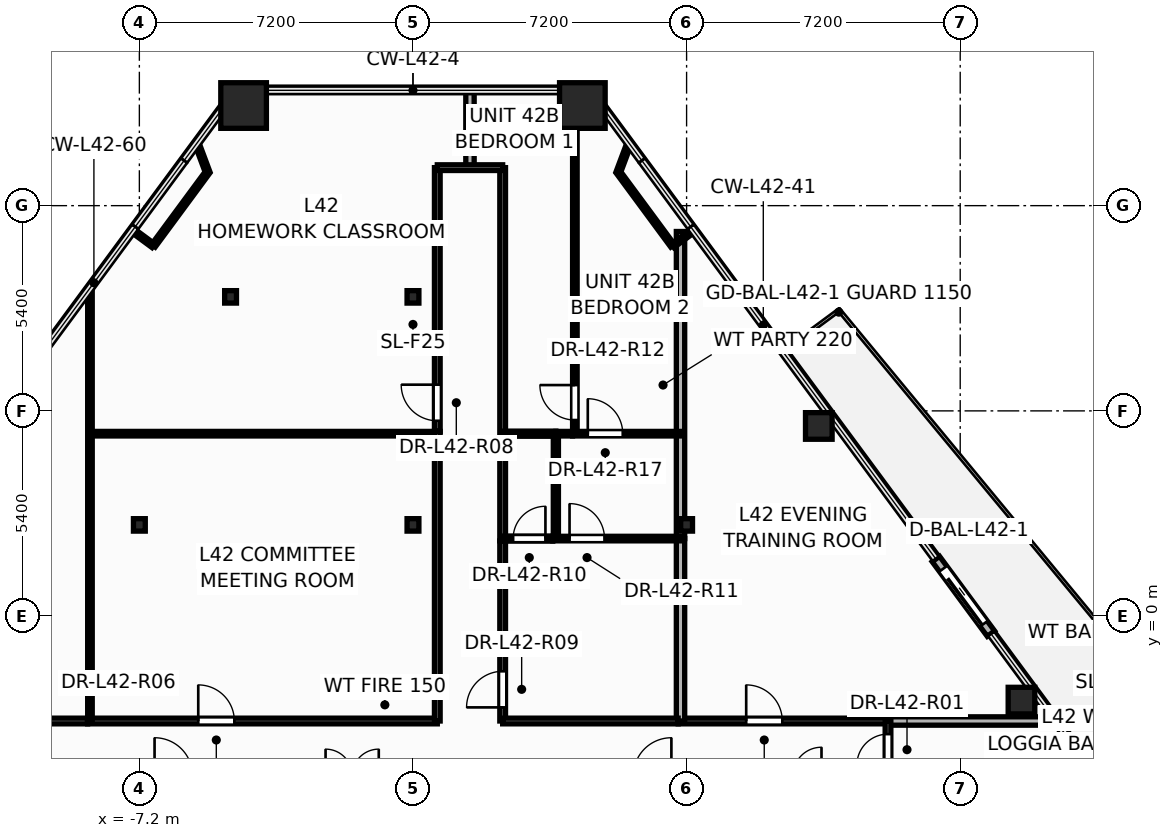
"""IFC4 building model, lengths in metres.
Left out: names, types, materials, properties, quantities, classifications, styles, units other than length and angle.
Written with IfcOpenShell. Run it as: python <this file> out.ifc"""

import sys

from ifc_helpers import new_model, si_unit, direction, frame, frame_2d, origin, origin_2d, place, context, subcontext, project, spatial, rectangle, hollow_rectangle, hollow_circle, i_section, extrude, element, fill, save


model = new_model("IFC4")
c1 = context("Model", 3, precision=1e-05, world=origin(), true_north=direction((0.0, 1.0)))
c2 = subcontext(c1, "Body", "Model", "MODEL_VIEW")
j1 = project(units=[si_unit("LENGTHUNIT", "METRE"), si_unit("PLANEANGLEUNIT", "RADIAN")], contexts=[c1])
p1 = place(None, origin())
s1 = spatial("IfcSite", under=j1, at=p1, CompositionType="ELEMENT")
p2 = place(p1, origin())
s2 = spatial("IfcBuilding", under=s1, at=p2, CompositionType="ELEMENT")
p3 = place(p2, frame((0.0, 0.0, 161.7)))
s3 = spatial("IfcBuildingStorey", under=s2, at=p3, CompositionType="ELEMENT", Elevation=161.7)
for number, where, z_axis, x_axis in (
    (1, (4.457, 13.435, 0.0), (0.0, 0.0, 1.0), (1.0, 0.0, 0.0)),
    (2, (-4.457, 13.435, 0.0), (0.0, 0.0, 1.0), (1.0, 0.0, 0.0)),
):
    element("IfcColumn", number, at=place(p3, frame(where, z_axis=z_axis, x_axis=x_axis)), inside=s3, PredefinedType="COLUMN", context=c2, shape_type="SweptSolid", body=[
        extrude(hollow_rectangle(XDim=1.2, YDim=1.2, WallThickness=0.055, at=origin_2d()), origin(), (0.0, 0.0, 1.0), 3.6),
    ])
for number, where, z_axis, x_axis in (
    (3, (16.012, -2.223, 0.0), (0.0, 0.0, 1.0), (1.0, 0.0, 0.0)),
    (4, (10.679, 5.003, 0.0), (0.0, 0.0, 1.0), (1.0, 0.0, 0.0)),
):
    element("IfcColumn", number, at=place(p3, frame(where, z_axis=z_axis, x_axis=x_axis)), inside=s3, PredefinedType="COLUMN", context=c2, shape_type="SweptSolid", body=[
        extrude(hollow_circle(Radius=0.35, WallThickness=0.03, at=origin_2d()), origin(), (0.0, 0.0, 1.0), 3.6),
    ])
for number, where, z_axis, x_axis in (
    (5, (-7.2, 2.4, 0.0), (0.0, 0.0, 1.0), (1.0, 0.0, 0.0)),
    (6, (0.0, 2.4, 0.0), (0.0, 0.0, 1.0), (1.0, 0.0, 0.0)),
    (7, (7.2, 2.4, 0.0), (0.0, 0.0, 1.0), (1.0, 0.0, 0.0)),
    (8, (-4.8, 8.4, 0.0), (0.0, 0.0, 1.0), (1.0, 0.0, 0.0)),
    (9, (0.0, 8.4, 0.0), (0.0, 0.0, 1.0), (1.0, 0.0, 0.0)),
    (10, (4.8, 8.4, 0.0), (0.0, 0.0, 1.0), (1.0, 0.0, 0.0)),
):
    element("IfcColumn", number, at=place(p3, frame(where, z_axis=z_axis, x_axis=x_axis)), inside=s3, PredefinedType="COLUMN", context=c2, shape_type="SweptSolid", body=[
        extrude(i_section(OverallWidth=0.311, OverallDepth=0.327, WebThickness=0.016, FlangeThickness=0.025, at=origin_2d()), origin(), (0.0, 0.0, 1.0), 3.6),
    ])
p4 = place(p3, frame((15.208, -0.461, -0.015), z_axis=(0.0, 0.0, 1.0), x_axis=(-0.593785976482, 0.804623026102, 0.0)))
e11 = element("IfcWall", 11, at=p4, inside=s3, PredefinedType="STANDARD", context=c2, shape_type="SweptSolid", body=[
    extrude(rectangle(XDim=2.44, YDim=0.24, at=frame_2d((1.22, 0.0))), origin(), (0.0, 0.0, 1.0), 2.807),
])
p5 = place(p4, frame((0.32, 0.0, 0.015)))
e12 = element("IfcOpeningElement", 12, at=p5, cuts=e11, PredefinedType="OPENING", context=c2, shape_type="SweptSolid", body=[
    extrude(rectangle(XDim=1.806, YDim=2.204, at=frame_2d((0.9, 1.102))), frame((0.0, 0.13, 0.0), z_axis=(0.0, -1.0, 0.0), x_axis=(1.0, 0.0, 0.0)), (0.0, 0.0, 1.0), 0.26),
])
p6 = place(p3, frame((-8.56, -2.76, 0.0), z_axis=(0.0, 0.0, 1.0), x_axis=(1.0, 0.0, 0.0)))
e13 = element("IfcWall", 13, at=p6, inside=s3, PredefinedType="PARTITIONING", context=c2, shape_type="SweptSolid", body=[
    extrude(rectangle(XDim=9.2, YDim=0.15, at=frame_2d((4.6, 0.0))), origin(), (0.0, 0.0, 1.0), 2.325),
])
p7 = place(p6, frame((2.91, 0.0, 0.0)))
e14 = element("IfcOpeningElement", 14, at=p7, cuts=e13, PredefinedType="OPENING", context=c2, shape_type="SweptSolid", body=[
    extrude(rectangle(XDim=0.956, YDim=2.104, at=frame_2d((0.475, 1.052))), frame((0.0, 0.085, 0.0), z_axis=(0.0, -1.0, 0.0), x_axis=(1.0, 0.0, 0.0)), (0.0, 0.0, 1.0), 0.17),
])
p8 = place(p3, frame((-8.5, 4.8, 0.0), z_axis=(0.0, 0.0, 1.0), x_axis=(1.0, 0.0, 0.0)))
e15 = element("IfcWall", 15, at=p8, inside=s3, PredefinedType="PARTITIONING", context=c2, shape_type="SweptSolid", body=[
    extrude(rectangle(XDim=9.14, YDim=0.12, at=frame_2d((4.57, 0.0))), origin(), (0.0, 0.0, 1.0), 2.325),
])
p9 = place(p3, frame((4.26, 4.8, 0.0), z_axis=(0.0, 0.0, 1.0), x_axis=(0.0, 1.0, 0.0)))
e16 = element("IfcWall", 16, at=p9, inside=s3, PredefinedType="PARTITIONING", context=c2, shape_type="SweptSolid", body=[
    extrude(rectangle(XDim=9.035, YDim=0.12, at=frame_2d((4.517, 0.0))), origin(), (0.0, 0.0, 1.0), 2.617),
])
p10 = place(p9, frame((0.359, 0.0, 0.0)))
e17 = element("IfcOpeningElement", 17, at=p10, cuts=e16, PredefinedType="OPENING", context=c2, shape_type="SweptSolid", body=[
    extrude(rectangle(XDim=0.926, YDim=2.104, at=frame_2d((0.46, 1.052))), frame((0.0, 0.07, 0.0), z_axis=(0.0, -1.0, 0.0), x_axis=(1.0, 0.0, 0.0)), (0.0, 0.0, 1.0), 0.14),
])
p11 = place(p3, frame((0.64, -2.76, 0.0), z_axis=(0.0, 0.0, 1.0), x_axis=(0.0, 1.0, 0.0)))
e18 = element("IfcWall", 18, at=p11, inside=s3, PredefinedType="PARTITIONING", context=c2, shape_type="SweptSolid", body=[
    extrude(rectangle(XDim=7.62, YDim=0.15, at=frame_2d((3.81, 0.0))), origin(), (0.0, 0.0, 1.0), 2.325),
])
p12 = place(p3, frame((-8.5, -2.76, 0.0), z_axis=(0.0, 0.0, 1.0), x_axis=(0.0, 1.0, 0.0)))
e19 = element("IfcWall", 19, at=p12, inside=s3, PredefinedType="PARTITIONING", context=c2, shape_type="SweptSolid", body=[
    extrude(rectangle(XDim=11.39, YDim=0.12, at=frame_2d((5.695, 0.0))), origin(), (0.0, 0.0, 1.0), 2.617),
])
p13 = place(p3, frame((0.64, 4.862, 0.0), z_axis=(0.0, 0.0, 1.0), x_axis=(0.0, 1.0, 0.0)))
e20 = element("IfcWall", 20, at=p13, inside=s3, PredefinedType="PARTITIONING", context=c2, shape_type="SweptSolid", body=[
    extrude(rectangle(XDim=6.938, YDim=0.15, at=frame_2d((3.469, 0.0))), origin(), (0.0, 0.0, 1.0), 2.617),
])
p14 = place(p13, frame((0.278, 0.0, 0.0)))
e21 = element("IfcOpeningElement", 21, at=p14, cuts=e20, PredefinedType="OPENING", context=c2, shape_type="SweptSolid", body=[
    extrude(rectangle(XDim=0.956, YDim=2.104, at=frame_2d((0.475, 1.052))), frame((0.0, 0.085, 0.0), z_axis=(0.0, -1.0, 0.0), x_axis=(1.0, 0.0, 0.0)), (0.0, 0.0, 1.0), 0.17),
])
p15 = place(p3, frame((2.36, 1.98, 0.0), z_axis=(0.0, 0.0, 1.0), x_axis=(0.0, 1.0, 0.0)))
e22 = element("IfcWall", 22, at=p15, inside=s3, PredefinedType="PARTITIONING", context=c2, shape_type="SweptSolid", body=[
    extrude(rectangle(XDim=9.82, YDim=0.15, at=frame_2d((4.91, 0.0))), origin(), (0.0, 0.0, 1.0), 2.325),
])
p16 = place(p3, frame((6.98, -2.76, 0.0), z_axis=(0.0, 0.0, 1.0), x_axis=(1.0, 0.0, 0.0)))
e23 = element("IfcWall", 23, at=p16, inside=s3, PredefinedType="PARTITIONING", context=c2, shape_type="SweptSolid", body=[
    extrude(rectangle(XDim=5.52, YDim=0.15, at=frame_2d((2.76, 0.0))), origin(), (0.0, 0.0, 1.0), 2.325),
])
p17 = place(p16, frame((1.788, 0.0, 0.0)))
e24 = element("IfcOpeningElement", 24, at=p17, cuts=e23, PredefinedType="OPENING", context=c2, shape_type="SweptSolid", body=[
    extrude(rectangle(XDim=0.956, YDim=2.104, at=frame_2d((0.475, 1.052))), frame((0.0, 0.085, 0.0), z_axis=(0.0, -1.0, 0.0), x_axis=(1.0, 0.0, 0.0)), (0.0, 0.0, 1.0), 0.17),
])
p18 = place(p3, frame((7.04, 2.04, 0.0), z_axis=(0.0, 0.0, 1.0), x_axis=(0.0, 1.0, 0.0)))
e25 = element("IfcWall", 25, at=p18, inside=s3, PredefinedType="PARTITIONING", context=c2, shape_type="SweptSolid", body=[
    extrude(rectangle(XDim=8.08, YDim=0.22, at=frame_2d((4.04, 0.0))), origin(), (0.0, 0.0, 1.0), 2.325),
])
p19 = place(p3, frame((2.36, -2.76, 0.0), z_axis=(0.0, 0.0, 1.0), x_axis=(0.0, 1.0, 0.0)))
e26 = element("IfcWall", 26, at=p19, inside=s3, PredefinedType="PARTITIONING", context=c2, shape_type="SweptSolid", body=[
    extrude(rectangle(XDim=4.738, YDim=0.15, at=frame_2d((2.369, 0.0))), origin(), (0.0, 0.0, 1.0), 3.35),
])
p20 = place(p19, frame((0.358, 0.0, 0.0)))
e27 = element("IfcOpeningElement", 27, at=p20, cuts=e26, PredefinedType="OPENING", context=c2, shape_type="SweptSolid", body=[
    extrude(rectangle(XDim=0.956, YDim=2.104, at=frame_2d((0.475, 1.052))), frame((0.0, 0.085, 0.0), z_axis=(0.0, -1.0, 0.0), x_axis=(1.0, 0.0, 0.0)), (0.0, 0.0, 1.0), 0.17),
])
p21 = place(p3, frame((7.04, -2.76, 0.0), z_axis=(0.0, 0.0, 1.0), x_axis=(0.0, 1.0, 0.0)))
e28 = element("IfcWall", 28, at=p21, inside=s3, PredefinedType="PARTITIONING", context=c2, shape_type="SweptSolid", body=[
    extrude(rectangle(XDim=4.8, YDim=0.22, at=frame_2d((2.4, 0.0))), origin(), (0.0, 0.0, 1.0), 2.325),
])
p22 = place(p3, frame((2.36, -2.76, 0.0), z_axis=(0.0, 0.0, 1.0), x_axis=(1.0, 0.0, 0.0)))
e29 = element("IfcWall", 29, at=p22, inside=s3, PredefinedType="PARTITIONING", context=c2, shape_type="SweptSolid", body=[
    extrude(rectangle(XDim=4.618, YDim=0.15, at=frame_2d((2.309, 0.0))), origin(), (0.0, 0.0, 1.0), 2.919),
])
p23 = place(p3, frame((12.5, -2.76, 0.0), z_axis=(0.0, 0.0, 1.0), x_axis=(1.0, 0.0, 0.0)))
e30 = element("IfcWall", 30, at=p23, inside=s3, PredefinedType="PARTITIONING", context=c2, shape_type="SweptSolid", body=[
    extrude(rectangle(XDim=4.405, YDim=0.22, at=frame_2d((2.203, 0.0))), origin(), (0.0, 0.0, 1.0), 2.792),
])
p24 = place(p3, frame((-12.5, -2.76, 0.0), z_axis=(0.0, 0.0, 1.0), x_axis=(1.0, 0.0, 0.0)))
e31 = element("IfcWall", 31, at=p24, inside=s3, PredefinedType="PARTITIONING", context=c2, shape_type="SweptSolid", body=[
    extrude(rectangle(XDim=3.938, YDim=0.15, at=frame_2d((1.969, 0.0))), origin(), (0.0, 0.0, 1.0), 3.35),
])
p25 = place(p24, frame((1.675, 0.0, 0.0)))
e32 = element("IfcOpeningElement", 32, at=p25, cuts=e31, PredefinedType="OPENING", context=c2, shape_type="SweptSolid", body=[
    extrude(rectangle(XDim=0.956, YDim=2.104, at=frame_2d((0.475, 1.052))), frame((0.0, 0.085, 0.0), z_axis=(0.0, -1.0, 0.0), x_axis=(1.0, 0.0, 0.0)), (0.0, 0.0, 1.0), 0.17),
])
p26 = place(p3, frame((3.68, 2.04, 0.0), z_axis=(0.0, 0.0, 1.0), x_axis=(1.0, 0.0, 0.0)))
e33 = element("IfcWall", 33, at=p26, inside=s3, PredefinedType="PARTITIONING", context=c2, shape_type="SweptSolid", body=[
    extrude(rectangle(XDim=3.36, YDim=0.12, at=frame_2d((1.68, 0.0))), origin(), (0.0, 0.0, 1.0), 2.325),
])
p27 = place(p26, frame((0.44, 0.0, 0.0)))
e34 = element("IfcOpeningElement", 34, at=p27, cuts=e33, PredefinedType="OPENING", context=c2, shape_type="SweptSolid", body=[
    extrude(rectangle(XDim=0.926, YDim=2.104, at=frame_2d((0.46, 1.052))), frame((0.0, 0.07, 0.0), z_axis=(0.0, -1.0, 0.0), x_axis=(1.0, 0.0, 0.0)), (0.0, 0.0, 1.0), 0.14),
])
p28 = place(p3, frame((4.2, 4.8, 0.0), z_axis=(0.0, 0.0, 1.0), x_axis=(1.0, 0.0, 0.0)))
e35 = element("IfcWall", 35, at=p28, inside=s3, PredefinedType="PARTITIONING", context=c2, shape_type="SweptSolid", body=[
    extrude(rectangle(XDim=2.84, YDim=0.12, at=frame_2d((1.42, 0.0))), origin(), (0.0, 0.0, 1.0), 2.617),
])
p29 = place(p28, frame((0.4, 0.0, 0.0)))
e36 = element("IfcOpeningElement", 36, at=p29, cuts=e35, PredefinedType="OPENING", context=c2, shape_type="SweptSolid", body=[
    extrude(rectangle(XDim=0.926, YDim=2.104, at=frame_2d((0.46, 1.052))), frame((0.0, 0.07, 0.0), z_axis=(0.0, -1.0, 0.0), x_axis=(1.0, 0.0, 0.0)), (0.0, 0.0, 1.0), 0.14),
])
p30 = place(p3, frame((3.76, 2.04, 0.0), z_axis=(0.0, 0.0, 1.0), x_axis=(0.0, 1.0, 0.0)))
e37 = element("IfcWall", 37, at=p30, inside=s3, PredefinedType="PARTITIONING", context=c2, shape_type="SweptSolid", body=[
    extrude(rectangle(XDim=2.76, YDim=0.135, at=frame_2d((1.38, 0.0))), origin(), (0.0, 0.0, 1.0), 2.325),
])
for number, where, z_axis, x_axis in (
    (38, (-5.404, 11.68, 0.0), (0.0, 0.0, 1.0), (-0.594, -0.805, 0.0)),
    (39, (6.831, 9.746, 0.0), (0.0, 0.0, 1.0), (-0.594, 0.805, 0.0)),
):
    element("IfcWall", number, at=place(p3, frame(where, z_axis=z_axis, x_axis=x_axis)), inside=s3, PredefinedType="PARTITIONING", context=c2, shape_type="SweptSolid", body=[
        extrude(rectangle(XDim=2.404, YDim=0.12, at=frame_2d((1.202, 0.0))), origin(), (0.0, 0.0, 1.0), 3.35),
    ])
p31 = place(p3, frame((1.5, 11.8, 0.0), z_axis=(0.0, 0.0, 1.0), x_axis=(0.0, 1.0, 0.0)))
e40 = element("IfcWall", 40, at=p31, inside=s3, PredefinedType="PARTITIONING", context=c2, shape_type="SweptSolid", body=[
    extrude(rectangle(XDim=2.035, YDim=0.22, at=frame_2d((1.017, 0.0))), origin(), (0.0, 0.0, 1.0), 2.792),
])
p32 = place(p3, frame((12.5, -4.24, 0.0), z_axis=(0.0, 0.0, 1.0), x_axis=(0.0, 1.0, 0.0)))
e41 = element("IfcWall", 41, at=p32, inside=s3, PredefinedType="PARTITIONING", context=c2, shape_type="SweptSolid", body=[
    extrude(rectangle(XDim=1.48, YDim=0.15, at=frame_2d((0.74, 0.0))), origin(), (0.0, 0.0, 1.0), 2.325),
])
p33 = place(p32, frame((0.315, 0.0, 0.0)))
e42 = element("IfcOpeningElement", 42, at=p33, cuts=e41, PredefinedType="OPENING", context=c2, shape_type="SweptSolid", body=[
    extrude(rectangle(XDim=0.826, YDim=2.104, at=frame_2d((0.41, 1.052))), frame((0.0, 0.085, 0.0), z_axis=(0.0, -1.0, 0.0), x_axis=(1.0, 0.0, 0.0)), (0.0, 0.0, 1.0), 0.17),
])
p34 = place(p3, frame((2.36, 2.04, 0.0), z_axis=(0.0, 0.0, 1.0), x_axis=(1.0, 0.0, 0.0)))
e43 = element("IfcWall", 43, at=p34, inside=s3, PredefinedType="PARTITIONING", context=c2, shape_type="SweptSolid", body=[
    extrude(rectangle(XDim=1.318, YDim=0.135, at=frame_2d((0.659, 0.0))), origin(), (0.0, 0.0, 1.0), 2.919),
])
p35 = place(p34, frame((0.276, 0.0, 0.0)))
e44 = element("IfcOpeningElement", 44, at=p35, cuts=e43, PredefinedType="OPENING", context=c2, shape_type="SweptSolid", body=[
    extrude(rectangle(XDim=0.856, YDim=2.104, at=frame_2d((0.425, 1.052))), frame((0.0, 0.078, 0.0), z_axis=(0.0, -1.0, 0.0), x_axis=(1.0, 0.0, 0.0)), (0.0, 0.0, 1.0), 0.155),
])
p36 = place(p3, frame((2.36, 4.8, 0.0), z_axis=(0.0, 0.0, 1.0), x_axis=(1.0, 0.0, 0.0)))
e45 = element("IfcWall", 45, at=p36, inside=s3, PredefinedType="PARTITIONING", context=c2, shape_type="SweptSolid", body=[
    extrude(rectangle(XDim=1.4, YDim=0.135, at=frame_2d((0.7, 0.0))), origin(), (0.0, 0.0, 1.0), 2.919),
])
p37 = place(p3, frame((0.64, 11.8, 0.0), z_axis=(0.0, 0.0, 1.0), x_axis=(1.0, 0.0, 0.0)))
e46 = element("IfcWall", 46, at=p37, inside=s3, PredefinedType="PARTITIONING", context=c2, shape_type="SweptSolid", body=[
    extrude(rectangle(XDim=1.72, YDim=0.15, at=frame_2d((0.86, 0.0))), origin(), (0.0, 0.0, 1.0), 3.35),
])
for number, where, z_axis, x_axis in (
    (47, (-5.684, 12.429, 0.0), (0.0, 0.0, 1.0), (0.351, -0.937, 0.0)),
    (48, (5.404, 11.68, 0.0), (0.0, 0.0, 1.0), (0.351, 0.937, 0.0)),
):
    element("IfcWall", number, at=place(p3, frame(where, z_axis=z_axis, x_axis=x_axis)), inside=s3, PredefinedType="PARTITIONING", context=c2, shape_type="SweptSolid", body=[
        extrude(rectangle(XDim=0.799, YDim=0.12, at=frame_2d((0.4, 0.0))), origin(), (0.0, 0.0, 1.0), 2.792),
    ])
for number, where, z_axis, x_axis in (
    (49, (-6.831, 9.746, 0.0), (0.0, 0.0, 1.0), (-0.805, 0.594, 0.0)),
    (50, (7.371, 10.144, 0.0), (0.0, 0.0, 1.0), (-0.805, -0.594, 0.0)),
):
    element("IfcWall", number, at=place(p3, frame(where, z_axis=z_axis, x_axis=x_axis)), inside=s3, PredefinedType="PARTITIONING", context=c2, shape_type="SweptSolid", body=[
        extrude(rectangle(XDim=0.67, YDim=0.12, at=frame_2d((0.335, 0.0))), origin(), (0.0, 0.0, 1.0), 2.792),
    ])
p38 = place(p3, frame((3.76, 4.8, 0.0), z_axis=(0.0, 0.0, 1.0), x_axis=(1.0, 0.0, 0.0)))
e51 = element("IfcWall", 51, at=p38, inside=s3, PredefinedType="PARTITIONING", context=c2, shape_type="SweptSolid", body=[
    extrude(rectangle(XDim=0.438, YDim=0.12, at=frame_2d((0.219, 0.0))), origin(), (0.0, 0.0, 1.0), 3.35),
])
p39 = place(p5, origin())
e52 = element("IfcDoor", 52, at=p39, inside=s3, OperationType="SLIDING_TO_LEFT", PredefinedType="DOOR", context=c2, shape_type="SweptSolid", body=[
    extrude(rectangle(XDim=1.8, YDim=2.2, at=frame_2d((0.9, 1.1))), frame((0.0, 0.025, 0.0), z_axis=(0.0, -1.0, 0.0), x_axis=(1.0, 0.0, 0.0)), (0.0, 0.0, 1.0), 0.05),
])
fill(e12, e52)
p40 = place(p33, origin())
e53 = element("IfcDoor", 53, at=p40, inside=s3, OperationType="SINGLE_SWING_LEFT", PredefinedType="DOOR", context=c2, shape_type="SweptSolid", body=[
    extrude(rectangle(XDim=0.82, YDim=2.1, at=frame_2d((0.41, 1.05))), frame((0.0, 0.025, 0.0), z_axis=(0.0, -1.0, 0.0), x_axis=(1.0, 0.0, 0.0)), (0.0, 0.0, 1.0), 0.05),
])
fill(e42, e53)
p41 = place(p7, origin())
e54 = element("IfcDoor", 54, at=p41, inside=s3, OperationType="SINGLE_SWING_LEFT", PredefinedType="DOOR", context=c2, shape_type="SweptSolid", body=[
    extrude(rectangle(XDim=0.95, YDim=2.1, at=frame_2d((0.475, 1.05))), frame((0.0, 0.025, 0.0), z_axis=(0.0, -1.0, 0.0), x_axis=(1.0, 0.0, 0.0)), (0.0, 0.0, 1.0), 0.05),
])
fill(e14, e54)
p42 = place(p14, origin())
e55 = element("IfcDoor", 55, at=p42, inside=s3, OperationType="SINGLE_SWING_RIGHT", PredefinedType="DOOR", context=c2, shape_type="SweptSolid", body=[
    extrude(rectangle(XDim=0.95, YDim=2.1, at=frame_2d((0.475, 1.05))), frame((0.0, 0.025, 0.0), z_axis=(0.0, -1.0, 0.0), x_axis=(1.0, 0.0, 0.0)), (0.0, 0.0, 1.0), 0.05),
])
fill(e21, e55)
p43 = place(p20, origin())
e56 = element("IfcDoor", 56, at=p43, inside=s3, OperationType="SINGLE_SWING_LEFT", PredefinedType="DOOR", context=c2, shape_type="SweptSolid", body=[
    extrude(rectangle(XDim=0.95, YDim=2.1, at=frame_2d((0.475, 1.05))), frame((0.0, 0.025, 0.0), z_axis=(0.0, -1.0, 0.0), x_axis=(1.0, 0.0, 0.0)), (0.0, 0.0, 1.0), 0.05),
])
fill(e27, e56)
p44 = place(p35, origin())
e57 = element("IfcDoor", 57, at=p44, inside=s3, OperationType="SINGLE_SWING_RIGHT", PredefinedType="DOOR", context=c2, shape_type="SweptSolid", body=[
    extrude(rectangle(XDim=0.85, YDim=2.1, at=frame_2d((0.425, 1.05))), frame((0.0, 0.025, 0.0), z_axis=(0.0, -1.0, 0.0), x_axis=(1.0, 0.0, 0.0)), (0.0, 0.0, 1.0), 0.05),
])
fill(e44, e57)
p45 = place(p27, origin())
e58 = element("IfcDoor", 58, at=p45, inside=s3, OperationType="SINGLE_SWING_LEFT", PredefinedType="DOOR", context=c2, shape_type="SweptSolid", body=[
    extrude(rectangle(XDim=0.92, YDim=2.1, at=frame_2d((0.46, 1.05))), frame((0.0, 0.025, 0.0), z_axis=(0.0, -1.0, 0.0), x_axis=(1.0, 0.0, 0.0)), (0.0, 0.0, 1.0), 0.05),
])
fill(e34, e58)
p46 = place(p10, origin())
e59 = element("IfcDoor", 59, at=p46, inside=s3, OperationType="SINGLE_SWING_RIGHT", PredefinedType="DOOR", context=c2, shape_type="SweptSolid", body=[
    extrude(rectangle(XDim=0.92, YDim=2.1, at=frame_2d((0.46, 1.05))), frame((0.0, 0.025, 0.0), z_axis=(0.0, -1.0, 0.0), x_axis=(1.0, 0.0, 0.0)), (0.0, 0.0, 1.0), 0.05),
])
fill(e17, e59)
p47 = place(p17, origin())
e60 = element("IfcDoor", 60, at=p47, inside=s3, OperationType="SINGLE_SWING_LEFT", PredefinedType="DOOR", context=c2, shape_type="SweptSolid", body=[
    extrude(rectangle(XDim=0.95, YDim=2.1, at=frame_2d((0.475, 1.05))), frame((0.0, 0.025, 0.0), z_axis=(0.0, -1.0, 0.0), x_axis=(1.0, 0.0, 0.0)), (0.0, 0.0, 1.0), 0.05),
])
fill(e24, e60)
p48 = place(p29, origin())
e61 = element("IfcDoor", 61, at=p48, inside=s3, OperationType="SINGLE_SWING_LEFT", PredefinedType="DOOR", context=c2, shape_type="SweptSolid", body=[
    extrude(rectangle(XDim=0.92, YDim=2.1, at=frame_2d((0.46, 1.05))), frame((0.0, 0.025, 0.0), z_axis=(0.0, -1.0, 0.0), x_axis=(1.0, 0.0, 0.0)), (0.0, 0.0, 1.0), 0.05),
])
fill(e36, e61)
save(model, sys.argv[1])
